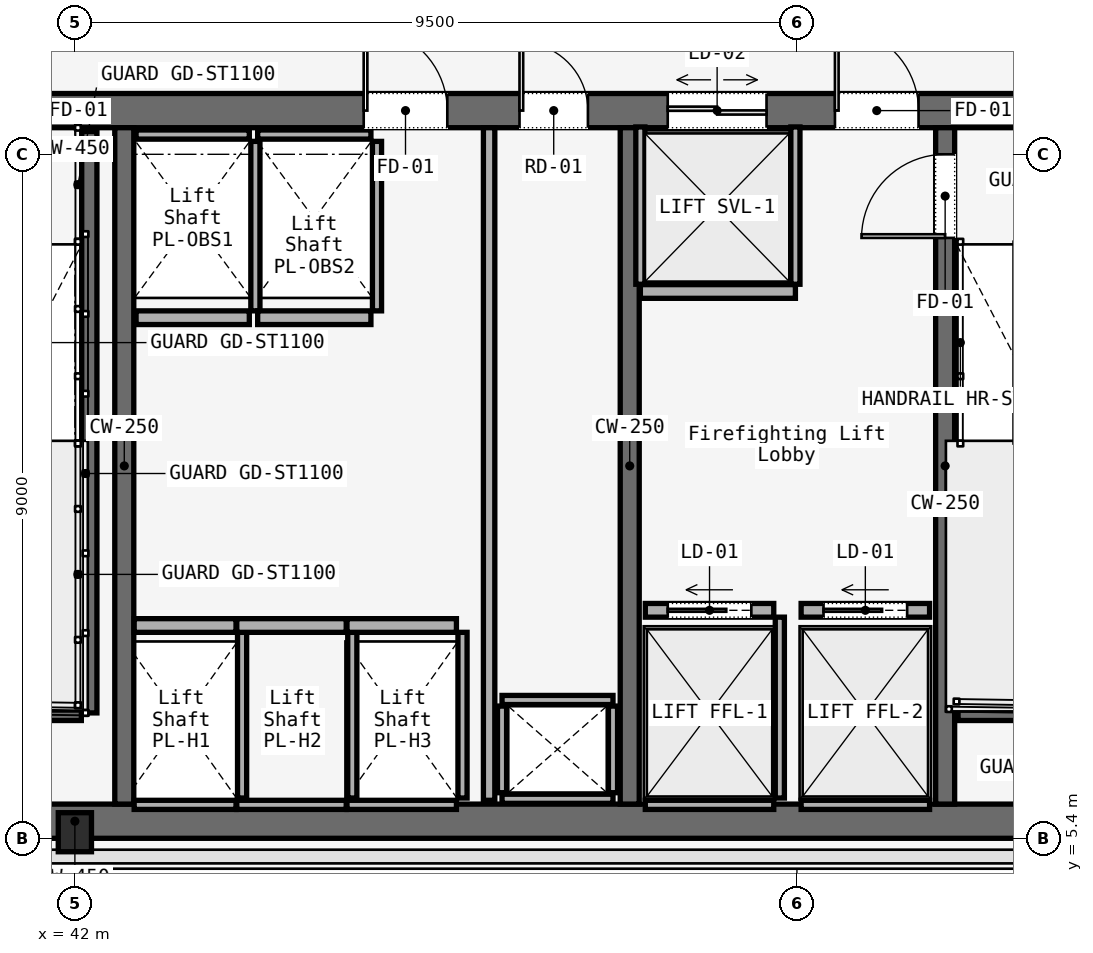
"""IFC4 building model, lengths in metres.
Left out: names, types, materials, properties, quantities, classifications, styles, units other than length and angle.
Written with IfcOpenShell. Run it as: python <this file> out.ifc"""

import sys

from ifc_helpers import new_model, si_unit, direction, frame, frame_2d, origin, origin_2d, place, context, subcontext, project, spatial, rectangle, i_section, extrude, element, fill, save


model = new_model("IFC4")
c1 = context("Model", 3, precision=1e-05, world=origin(), true_north=direction((0.0, 1.0)))
c2 = subcontext(c1, "Body", "Model", "MODEL_VIEW")
j1 = project(units=[si_unit("LENGTHUNIT", "METRE"), si_unit("PLANEANGLEUNIT", "RADIAN")], contexts=[c1])
p1 = place(None, origin())
s1 = spatial("IfcSite", under=j1, at=p1, CompositionType="ELEMENT")
p2 = place(p1, origin())
s2 = spatial("IfcBuilding", under=s1, at=p2, CompositionType="ELEMENT")
p3 = place(p2, frame((0.0, 0.0, 77.8)))
s3 = spatial("IfcBuildingStorey", under=s2, at=p3, CompositionType="ELEMENT", Elevation=77.8)
p4 = place(p3, frame((26.45, 14.975, 0.0), z_axis=(0.0, 0.0, 1.0), x_axis=(1.0, 0.0, 0.0)))
e1 = element("IfcWall", 1, at=p4, inside=s3, PredefinedType="SOLIDWALL", context=c2, shape_type="SweptSolid", body=[
    extrude(rectangle(XDim=31.1, YDim=0.45, at=frame_2d((15.55, 0.0))), origin(), (0.0, 0.0, 1.0), 3.58),
])
p5 = place(p4, frame((1.65, 0.0, 0.0)))
e2 = element("IfcOpeningElement", 2, at=p5, cuts=e1, PredefinedType="OPENING", context=c2, shape_type="SweptSolid", body=[
    extrude(rectangle(XDim=1.1, YDim=2.2, at=frame_2d((0.55, 1.1))), frame((0.0, 0.225, 0.0), z_axis=(0.0, -1.0, 0.0), x_axis=(1.0, 0.0, 0.0)), (0.0, 0.0, 1.0), 0.45),
])
p6 = place(p4, frame((13.65, 0.0, 0.0)))
e3 = element("IfcOpeningElement", 3, at=p6, cuts=e1, PredefinedType="OPENING", context=c2, shape_type="SweptSolid", body=[
    extrude(rectangle(XDim=1.1, YDim=2.2, at=frame_2d((0.55, 1.1))), frame((0.0, 0.225, 0.0), z_axis=(0.0, -1.0, 0.0), x_axis=(1.0, 0.0, 0.0)), (0.0, 0.0, 1.0), 0.45),
])
p7 = place(p4, frame((25.55, 0.0, 0.0)))
e4 = element("IfcOpeningElement", 4, at=p7, cuts=e1, PredefinedType="OPENING", context=c2, shape_type="SweptSolid", body=[
    extrude(rectangle(XDim=1.1, YDim=2.2, at=frame_2d((0.55, 1.1))), frame((0.0, 0.225, 0.0), z_axis=(0.0, -1.0, 0.0), x_axis=(1.0, 0.0, 0.0)), (0.0, 0.0, 1.0), 0.45),
])
p8 = place(p4, frame((10.7, 0.0, 0.0)))
e5 = element("IfcOpeningElement", 5, at=p8, cuts=e1, PredefinedType="OPENING", context=c2, shape_type="SweptSolid", body=[
    extrude(rectangle(XDim=1.4, YDim=2.2, at=frame_2d((0.7, 1.1))), frame((0.0, 0.225, 0.0), z_axis=(0.0, -1.0, 0.0), x_axis=(1.0, 0.0, 0.0)), (0.0, 0.0, 1.0), 0.45),
])
p9 = place(p4, frame((19.35, 0.0, 0.0)))
e6 = element("IfcOpeningElement", 6, at=p9, cuts=e1, PredefinedType="OPENING", context=c2, shape_type="SweptSolid", body=[
    extrude(rectangle(XDim=1.1, YDim=2.2, at=frame_2d((0.55, 1.1))), frame((0.0, 0.225, 0.0), z_axis=(0.0, -1.0, 0.0), x_axis=(1.0, 0.0, 0.0)), (0.0, 0.0, 1.0), 0.45),
])
p10 = place(p4, frame((21.4, 0.0, 0.0)))
e7 = element("IfcOpeningElement", 7, at=p10, cuts=e1, PredefinedType="OPENING", context=c2, shape_type="SweptSolid", body=[
    extrude(rectangle(XDim=0.9, YDim=2.1, at=frame_2d((0.45, 1.05))), frame((0.0, 0.225, 0.0), z_axis=(0.0, -1.0, 0.0), x_axis=(1.0, 0.0, 0.0)), (0.0, 0.0, 1.0), 0.45),
])
p11 = place(p4, frame((23.35, 0.0, 0.0)))
e8 = element("IfcOpeningElement", 8, at=p11, cuts=e1, PredefinedType="OPENING", context=c2, shape_type="SweptSolid", body=[
    extrude(rectangle(XDim=1.3, YDim=2.3, at=frame_2d((0.65, 1.15))), frame((0.0, 0.225, 0.0), z_axis=(0.0, -1.0, 0.0), x_axis=(1.0, 0.0, 0.0)), (0.0, 0.0, 1.0), 0.45),
])
p12 = place(p3, frame((26.45, 5.625, 0.0), z_axis=(0.0, 0.0, 1.0), x_axis=(1.0, 0.0, 0.0)))
e9 = element("IfcWall", 9, at=p12, inside=s3, PredefinedType="SOLIDWALL", context=c2, shape_type="SweptSolid", body=[
    extrude(rectangle(XDim=31.1, YDim=0.45, at=frame_2d((15.55, 0.0))), origin(), (0.0, 0.0, 1.0), 3.58),
])
for number, where, z_axis, x_axis in (
    (10, (42.65, 5.85, 0.0), (0.0, 0.0, 1.0), (0.0, 1.0, 0.0)),
    (11, (49.3, 5.85, 0.0), (0.0, 0.0, 1.0), (0.0, 1.0, 0.0)),
):
    element("IfcWall", number, at=place(p3, frame(where, z_axis=z_axis, x_axis=x_axis)), inside=s3, PredefinedType="SOLIDWALL", context=c2, shape_type="SweptSolid", body=[
        extrude(rectangle(XDim=8.9, YDim=0.25, at=frame_2d((4.45, 0.0))), origin(), (0.0, 0.0, 1.0), 3.58),
    ])
p13 = place(p3, frame((53.45, 5.85, 0.0), z_axis=(0.0, 0.0, 1.0), x_axis=(0.0, 1.0, 0.0)))
e12 = element("IfcWall", 12, at=p13, inside=s3, PredefinedType="SOLIDWALL", context=c2, shape_type="SweptSolid", body=[
    extrude(rectangle(XDim=8.9, YDim=0.25, at=frame_2d((4.45, 0.0))), origin(), (0.0, 0.0, 1.0), 3.58),
])
p14 = place(p13, frame((7.45, 0.0, 0.0)))
e13 = element("IfcOpeningElement", 13, at=p14, cuts=e12, PredefinedType="OPENING", context=c2, shape_type="SweptSolid", body=[
    extrude(rectangle(XDim=1.1, YDim=2.2, at=frame_2d((0.55, 1.1))), frame((0.0, 0.125, 0.0), z_axis=(0.0, -1.0, 0.0), x_axis=(1.0, 0.0, 0.0)), (0.0, 0.0, 1.0), 0.25),
])
p15 = place(p3, frame((42.0, 5.48, 0.0), z_axis=(0.0, 0.0, 1.0), x_axis=(1.0, 0.0, 0.0)))
e14 = element("IfcColumn", 14, at=p15, inside=s3, PredefinedType="COLUMN", context=c2, shape_type="SweptSolid", body=[
    extrude(i_section(OverallWidth=0.437, OverallDepth=0.514, WebThickness=0.061, FlangeThickness=0.077, FilletRadius=0.015, at=origin_2d()), origin(), (0.0, 0.0, 1.0), 3.58),
])
p16 = place(p3, frame((42.19, 14.7, 0.0), z_axis=(0.0, 0.0, 1.0), x_axis=(0.0, -1.0, 0.0)))
e15 = element("IfcWall", 15, at=p16, inside=s3, PredefinedType="SOLIDWALL", context=c2, shape_type="SweptSolid", body=[
    extrude(rectangle(XDim=7.65, YDim=0.2, at=frame_2d((3.825, 0.0))), origin(), (0.0, 0.0, 1.0), 3.8),
])
for number, where, z_axis, x_axis in (
    (16, (38.97, 7.05, 0.0), (0.0, 0.0, 1.0), (1.0, 0.0, 0.0)),
    (17, (53.62, 7.05, 0.0), (0.0, 0.0, 1.0), (1.0, 0.0, 0.0)),
):
    element("IfcWall", number, at=place(p3, frame(where, z_axis=z_axis, x_axis=x_axis)), inside=s3, PredefinedType="SOLIDWALL", context=c2, shape_type="SweptSolid", body=[
        extrude(rectangle(XDim=3.115, YDim=0.2, at=frame_2d((1.558, 0.0))), origin(), (0.0, 0.0, 1.0), 3.8),
    ])
for number, where, z_axis, x_axis in (
    (18, (47.62, 5.92, 0.0), (0.0, 0.0, 1.0), (1.0, 0.0, 0.0)),
    (19, (47.62, 7.22, 0.0), (0.0, 0.0, 1.0), (1.0, 0.0, 0.0)),
):
    element("IfcWall", number, at=place(p3, frame(where, z_axis=z_axis, x_axis=x_axis)), inside=s3, PredefinedType="SOLIDWALL", context=c2, shape_type="SweptSolid", body=[
        extrude(rectangle(XDim=1.46, YDim=0.12, at=frame_2d((0.73, 0.0))), origin(), (0.0, 0.0, 1.0), 2.95),
    ])
for number, where, z_axis, x_axis in (
    (20, (47.62, 6.0, 0.0), (0.0, 0.0, 1.0), (0.0, 1.0, 0.0)),
    (21, (49.08, 6.0, 0.0), (0.0, 0.0, 1.0), (0.0, 1.0, 0.0)),
):
    element("IfcWall", number, at=place(p3, frame(where, z_axis=z_axis, x_axis=x_axis)), inside=s3, PredefinedType="SOLIDWALL", context=c2, shape_type="SweptSolid", body=[
        extrude(rectangle(XDim=1.14, YDim=0.12, at=frame_2d((0.57, 0.0))), origin(), (0.0, 0.0, 1.0), 2.95),
    ])
p17 = place(p3, frame((47.45, 5.9, 0.0), z_axis=(0.0, 0.0, 1.0), x_axis=(0.0, 1.0, 0.0)))
e22 = element("IfcWall", 22, at=p17, inside=s3, PredefinedType="PARTITIONING", context=c2, shape_type="SweptSolid", body=[
    extrude(rectangle(XDim=8.85, YDim=0.15, at=frame_2d((4.425, 0.0))), origin(), (0.0, 0.0, 1.0), 2.95),
])
p18 = place(p3, frame((42.78, 8.2, 0.0), z_axis=(0.0, 0.0, 1.0), x_axis=(1.0, 0.0, 0.0)))
e23 = element("IfcWall", 23, at=p18, inside=s3, PredefinedType="SOLIDWALL", context=c2, shape_type="SweptSolid", body=[
    extrude(rectangle(XDim=1.34, YDim=0.18, at=frame_2d((0.67, 0.0))), origin(), (0.0, 0.0, 1.0), 2.95),
])
p19 = place(p3, frame((42.78, 5.84, 0.0), z_axis=(0.0, 0.0, 1.0), x_axis=(1.0, 0.0, 0.0)))
e24 = element("IfcWall", 24, at=p19, inside=s3, PredefinedType="SOLIDWALL", context=c2, shape_type="SweptSolid", body=[
    extrude(rectangle(XDim=1.34, YDim=0.12, at=frame_2d((0.67, 0.0))), origin(), (0.0, 0.0, 1.0), 2.95),
])
p20 = place(p3, frame((44.2, 5.93, 0.0), z_axis=(0.0, 0.0, 1.0), x_axis=(0.0, 1.0, 0.0)))
e25 = element("IfcWall", 25, at=p20, inside=s3, PredefinedType="SOLIDWALL", context=c2, shape_type="SweptSolid", body=[
    extrude(rectangle(XDim=2.18, YDim=0.12, at=frame_2d((1.09, 0.0))), origin(), (0.0, 0.0, 1.0), 2.95),
])
p21 = place(p3, frame((44.13, 8.2, 0.0), z_axis=(0.0, 0.0, 1.0), x_axis=(1.0, 0.0, 0.0)))
e26 = element("IfcWall", 26, at=p21, inside=s3, PredefinedType="SOLIDWALL", context=c2, shape_type="SweptSolid", body=[
    extrude(rectangle(XDim=1.44, YDim=0.18, at=frame_2d((0.72, 0.0))), origin(), (0.0, 0.0, 1.0), 2.95),
])
p22 = place(p3, frame((44.13, 5.84, 0.0), z_axis=(0.0, 0.0, 1.0), x_axis=(1.0, 0.0, 0.0)))
e27 = element("IfcWall", 27, at=p22, inside=s3, PredefinedType="SOLIDWALL", context=c2, shape_type="SweptSolid", body=[
    extrude(rectangle(XDim=1.44, YDim=0.12, at=frame_2d((0.72, 0.0))), origin(), (0.0, 0.0, 1.0), 2.95),
])
p23 = place(p3, frame((45.65, 5.93, 0.0), z_axis=(0.0, 0.0, 1.0), x_axis=(0.0, 1.0, 0.0)))
e28 = element("IfcWall", 28, at=p23, inside=s3, PredefinedType="SOLIDWALL", context=c2, shape_type="SweptSolid", body=[
    extrude(rectangle(XDim=2.18, YDim=0.12, at=frame_2d((1.09, 0.0))), origin(), (0.0, 0.0, 1.0), 2.95),
])
p24 = place(p3, frame((45.58, 8.2, 0.0), z_axis=(0.0, 0.0, 1.0), x_axis=(1.0, 0.0, 0.0)))
e29 = element("IfcWall", 29, at=p24, inside=s3, PredefinedType="SOLIDWALL", context=c2, shape_type="SweptSolid", body=[
    extrude(rectangle(XDim=1.44, YDim=0.18, at=frame_2d((0.72, 0.0))), origin(), (0.0, 0.0, 1.0), 2.95),
])
p25 = place(p3, frame((45.58, 5.84, 0.0), z_axis=(0.0, 0.0, 1.0), x_axis=(1.0, 0.0, 0.0)))
e30 = element("IfcWall", 30, at=p25, inside=s3, PredefinedType="SOLIDWALL", context=c2, shape_type="SweptSolid", body=[
    extrude(rectangle(XDim=1.44, YDim=0.12, at=frame_2d((0.72, 0.0))), origin(), (0.0, 0.0, 1.0), 2.95),
])
p26 = place(p3, frame((47.1, 5.93, 0.0), z_axis=(0.0, 0.0, 1.0), x_axis=(0.0, 1.0, 0.0)))
e31 = element("IfcWall", 31, at=p26, inside=s3, PredefinedType="SOLIDWALL", context=c2, shape_type="SweptSolid", body=[
    extrude(rectangle(XDim=2.18, YDim=0.12, at=frame_2d((1.09, 0.0))), origin(), (0.0, 0.0, 1.0), 2.95),
])
p27 = place(p3, frame((42.805, 12.25, 0.0), z_axis=(0.0, 0.0, 1.0), x_axis=(1.0, 0.0, 0.0)))
e32 = element("IfcWall", 32, at=p27, inside=s3, PredefinedType="SOLIDWALL", context=c2, shape_type="SweptSolid", body=[
    extrude(rectangle(XDim=1.49, YDim=0.18, at=frame_2d((0.745, 0.0))), origin(), (0.0, 0.0, 1.0), 2.95),
])
p28 = place(p3, frame((42.805, 14.66, 0.0), z_axis=(0.0, 0.0, 1.0), x_axis=(1.0, 0.0, 0.0)))
e33 = element("IfcWall", 33, at=p28, inside=s3, PredefinedType="SOLIDWALL", context=c2, shape_type="SweptSolid", body=[
    extrude(rectangle(XDim=1.49, YDim=0.12, at=frame_2d((0.745, 0.0))), origin(), (0.0, 0.0, 1.0), 2.95),
])
p29 = place(p3, frame((44.375, 12.34, 0.0), z_axis=(0.0, 0.0, 1.0), x_axis=(0.0, 1.0, 0.0)))
e34 = element("IfcWall", 34, at=p29, inside=s3, PredefinedType="SOLIDWALL", context=c2, shape_type="SweptSolid", body=[
    extrude(rectangle(XDim=2.23, YDim=0.12, at=frame_2d((1.115, 0.0))), origin(), (0.0, 0.0, 1.0), 2.95),
])
p30 = place(p3, frame((44.405, 12.25, 0.0), z_axis=(0.0, 0.0, 1.0), x_axis=(1.0, 0.0, 0.0)))
e35 = element("IfcWall", 35, at=p30, inside=s3, PredefinedType="SOLIDWALL", context=c2, shape_type="SweptSolid", body=[
    extrude(rectangle(XDim=1.49, YDim=0.18, at=frame_2d((0.745, 0.0))), origin(), (0.0, 0.0, 1.0), 2.95),
])
p31 = place(p3, frame((44.405, 14.66, 0.0), z_axis=(0.0, 0.0, 1.0), x_axis=(1.0, 0.0, 0.0)))
e36 = element("IfcWall", 36, at=p31, inside=s3, PredefinedType="SOLIDWALL", context=c2, shape_type="SweptSolid", body=[
    extrude(rectangle(XDim=1.49, YDim=0.12, at=frame_2d((0.745, 0.0))), origin(), (0.0, 0.0, 1.0), 2.95),
])
p32 = place(p3, frame((45.975, 12.34, 0.0), z_axis=(0.0, 0.0, 1.0), x_axis=(0.0, 1.0, 0.0)))
e37 = element("IfcWall", 37, at=p32, inside=s3, PredefinedType="SOLIDWALL", context=c2, shape_type="SweptSolid", body=[
    extrude(rectangle(XDim=2.23, YDim=0.12, at=frame_2d((1.115, 0.0))), origin(), (0.0, 0.0, 1.0), 2.95),
])
p33 = place(p3, frame((49.505, 8.4, 0.0), z_axis=(0.0, 0.0, 1.0), x_axis=(1.0, 0.0, 0.0)))
e38 = element("IfcWall", 38, at=p33, inside=s3, PredefinedType="SOLIDWALL", context=c2, shape_type="SweptSolid", body=[
    extrude(rectangle(XDim=1.69, YDim=0.18, at=frame_2d((0.845, 0.0))), origin(), (0.0, 0.0, 1.0), 2.95),
])
p34 = place(p33, frame((0.295, 0.0, 0.0)))
e39 = element("IfcOpeningElement", 39, at=p34, cuts=e38, PredefinedType="OPENING", context=c2, shape_type="SweptSolid", body=[
    extrude(rectangle(XDim=1.1, YDim=2.2, at=frame_2d((0.55, 1.1))), frame((0.0, 0.09, 0.0), z_axis=(0.0, -1.0, 0.0), x_axis=(1.0, 0.0, 0.0)), (0.0, 0.0, 1.0), 0.18),
])
p35 = place(p3, frame((49.505, 5.84, 0.0), z_axis=(0.0, 0.0, 1.0), x_axis=(1.0, 0.0, 0.0)))
e40 = element("IfcWall", 40, at=p35, inside=s3, PredefinedType="SOLIDWALL", context=c2, shape_type="SweptSolid", body=[
    extrude(rectangle(XDim=1.69, YDim=0.12, at=frame_2d((0.845, 0.0))), origin(), (0.0, 0.0, 1.0), 2.95),
])
p36 = place(p3, frame((51.275, 5.93, 0.0), z_axis=(0.0, 0.0, 1.0), x_axis=(0.0, 1.0, 0.0)))
e41 = element("IfcWall", 41, at=p36, inside=s3, PredefinedType="SOLIDWALL", context=c2, shape_type="SweptSolid", body=[
    extrude(rectangle(XDim=2.38, YDim=0.12, at=frame_2d((1.19, 0.0))), origin(), (0.0, 0.0, 1.0), 2.95),
])
p37 = place(p3, frame((51.555, 8.4, 0.0), z_axis=(0.0, 0.0, 1.0), x_axis=(1.0, 0.0, 0.0)))
e42 = element("IfcWall", 42, at=p37, inside=s3, PredefinedType="SOLIDWALL", context=c2, shape_type="SweptSolid", body=[
    extrude(rectangle(XDim=1.69, YDim=0.18, at=frame_2d((0.845, 0.0))), origin(), (0.0, 0.0, 1.0), 2.95),
])
p38 = place(p37, frame((0.295, 0.0, 0.0)))
e43 = element("IfcOpeningElement", 43, at=p38, cuts=e42, PredefinedType="OPENING", context=c2, shape_type="SweptSolid", body=[
    extrude(rectangle(XDim=1.1, YDim=2.2, at=frame_2d((0.55, 1.1))), frame((0.0, 0.09, 0.0), z_axis=(0.0, -1.0, 0.0), x_axis=(1.0, 0.0, 0.0)), (0.0, 0.0, 1.0), 0.18),
])
p39 = place(p3, frame((51.555, 5.84, 0.0), z_axis=(0.0, 0.0, 1.0), x_axis=(1.0, 0.0, 0.0)))
e44 = element("IfcWall", 44, at=p39, inside=s3, PredefinedType="SOLIDWALL", context=c2, shape_type="SweptSolid", body=[
    extrude(rectangle(XDim=1.69, YDim=0.12, at=frame_2d((0.845, 0.0))), origin(), (0.0, 0.0, 1.0), 2.95),
])
p40 = place(p3, frame((49.44, 12.595, 0.0), z_axis=(0.0, 0.0, 1.0), x_axis=(1.0, 0.0, 0.0)))
e45 = element("IfcWall", 45, at=p40, inside=s3, PredefinedType="SOLIDWALL", context=c2, shape_type="SweptSolid", body=[
    extrude(rectangle(XDim=2.04, YDim=0.18, at=frame_2d((1.02, 0.0))), origin(), (0.0, 0.0, 1.0), 2.95),
])
for number, where, z_axis, x_axis in (
    (46, (49.44, 12.69, 0.0), (0.0, 0.0, 1.0), (0.0, 1.0, 0.0)),
    (47, (51.48, 12.69, 0.0), (0.0, 0.0, 1.0), (0.0, 1.0, 0.0)),
):
    element("IfcWall", number, at=place(p3, frame(where, z_axis=z_axis, x_axis=x_axis)), inside=s3, PredefinedType="SOLIDWALL", context=c2, shape_type="SweptSolid", body=[
        extrude(rectangle(XDim=2.07, YDim=0.12, at=frame_2d((1.035, 0.0))), origin(), (0.0, 0.0, 1.0), 2.95),
    ])
p41 = place(p7, origin())
e48 = element("IfcDoor", 48, at=p41, inside=s3, OperationType="SINGLE_SWING_RIGHT", PredefinedType="DOOR", context=c2, shape_type="SweptSolid", body=[
    extrude(rectangle(XDim=1.1, YDim=2.2, at=frame_2d((0.55, 1.1))), frame((0.0, 0.025, 0.0), z_axis=(0.0, -1.0, 0.0), x_axis=(1.0, 0.0, 0.0)), (0.0, 0.0, 1.0), 0.05),
])
fill(e4, e48)
p42 = place(p9, origin())
e49 = element("IfcDoor", 49, at=p42, inside=s3, OperationType="SINGLE_SWING_LEFT", PredefinedType="DOOR", context=c2, shape_type="SweptSolid", body=[
    extrude(rectangle(XDim=1.1, YDim=2.2, at=frame_2d((0.55, 1.1))), frame((0.0, 0.025, 0.0), z_axis=(0.0, -1.0, 0.0), x_axis=(1.0, 0.0, 0.0)), (0.0, 0.0, 1.0), 0.05),
])
fill(e6, e49)
p43 = place(p10, origin())
e50 = element("IfcDoor", 50, at=p43, inside=s3, OperationType="SINGLE_SWING_LEFT", PredefinedType="DOOR", context=c2, shape_type="SweptSolid", body=[
    extrude(rectangle(XDim=0.9, YDim=2.1, at=frame_2d((0.45, 1.05))), frame((0.0, 0.025, 0.0), z_axis=(0.0, -1.0, 0.0), x_axis=(1.0, 0.0, 0.0)), (0.0, 0.0, 1.0), 0.05),
])
fill(e7, e50)
p44 = place(p14, origin())
e51 = element("IfcDoor", 51, at=p44, inside=s3, OperationType="SINGLE_SWING_LEFT", PredefinedType="DOOR", context=c2, shape_type="SweptSolid", body=[
    extrude(rectangle(XDim=1.1, YDim=2.2, at=frame_2d((0.55, 1.1))), frame((0.0, 0.025, 0.0), z_axis=(0.0, -1.0, 0.0), x_axis=(1.0, 0.0, 0.0)), (0.0, 0.0, 1.0), 0.05),
])
fill(e13, e51)
p45 = place(p34, origin())
e52 = element("IfcDoor", 52, at=p45, inside=s3, OperationType="SLIDING_TO_LEFT", PredefinedType="DOOR", context=c2, shape_type="SweptSolid", body=[
    extrude(rectangle(XDim=1.1, YDim=2.2, at=frame_2d((0.55, 1.1))), frame((0.0, 0.025, 0.0), z_axis=(0.0, -1.0, 0.0), x_axis=(1.0, 0.0, 0.0)), (0.0, 0.0, 1.0), 0.05),
])
fill(e39, e52)
p46 = place(p38, origin())
e53 = element("IfcDoor", 53, at=p46, inside=s3, OperationType="SLIDING_TO_LEFT", PredefinedType="DOOR", context=c2, shape_type="SweptSolid", body=[
    extrude(rectangle(XDim=1.1, YDim=2.2, at=frame_2d((0.55, 1.1))), frame((0.0, 0.025, 0.0), z_axis=(0.0, -1.0, 0.0), x_axis=(1.0, 0.0, 0.0)), (0.0, 0.0, 1.0), 0.05),
])
fill(e43, e53)
p47 = place(p11, origin())
e54 = element("IfcDoor", 54, at=p47, inside=s3, OperationType="DOUBLE_DOOR_SLIDING", PredefinedType="DOOR", context=c2, shape_type="SweptSolid", body=[
    extrude(rectangle(XDim=1.3, YDim=2.3, at=frame_2d((0.65, 1.15))), frame((0.0, 0.025, 0.0), z_axis=(0.0, -1.0, 0.0), x_axis=(1.0, 0.0, 0.0)), (0.0, 0.0, 1.0), 0.05),
])
fill(e8, e54)
save(model, sys.argv[1])
